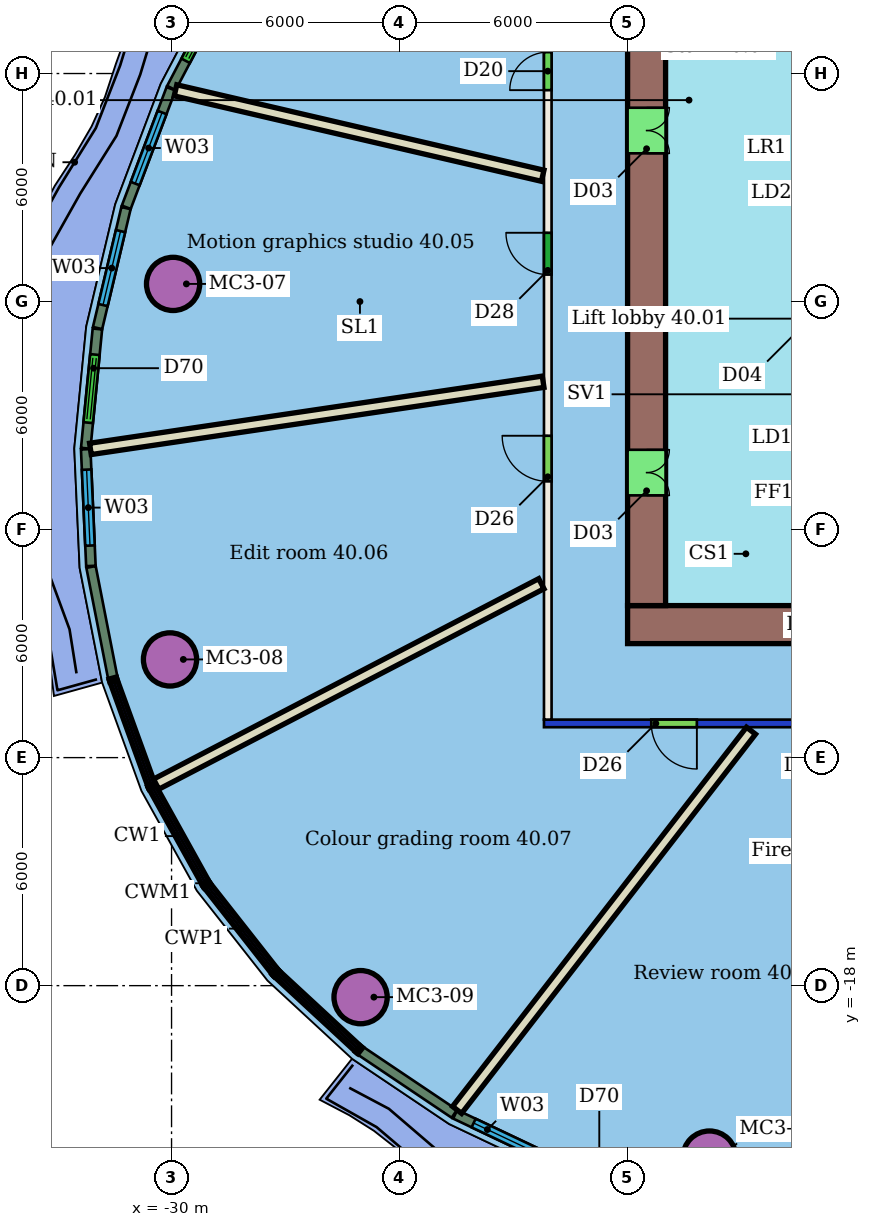
"""IFC4 building model, lengths in metres.
Left out: names, types, materials, properties, quantities, classifications, styles, units other than length and angle.
Written with IfcOpenShell. Run it as: python <this file> out.ifc"""

import sys

from ifc_helpers import new_model, si_unit, direction, frame, frame_2d, origin, origin_2d, place, context, subcontext, project, spatial, rectangle, hollow_circle, extrude, element, fill, save


model = new_model("IFC4")
c1 = context("Model", 3, precision=1e-05, world=origin(), true_north=direction((0.0, 1.0)))
c2 = subcontext(c1, "Body", "Model", "MODEL_VIEW")
j1 = project(units=[si_unit("LENGTHUNIT", "METRE"), si_unit("PLANEANGLEUNIT", "RADIAN")], contexts=[c1])
p1 = place(None, origin())
s1 = spatial("IfcSite", under=j1, at=p1, CompositionType="ELEMENT")
p2 = place(p1, origin())
s2 = spatial("IfcBuilding", under=s1, at=p2, CompositionType="ELEMENT")
p3 = place(p2, frame((0.0, 0.0, 168.6)))
s3 = spatial("IfcBuildingStorey", under=s2, at=p3, CompositionType="ELEMENT", Elevation=168.6)
for number, where, z_axis, x_axis in (
    (1, (-29.959, 0.464, 0.0), (0.0, 0.0, 1.0), (1.0, 0.0, 0.0)),
    (2, (-30.041, -9.417, 0.0), (0.0, 0.0, 1.0), (1.0, 0.0, 0.0)),
    (3, (-25.026, -18.303, 0.0), (0.0, 0.0, 1.0), (1.0, 0.0, 0.0)),
    (4, (-15.845, -22.524, 0.0), (0.0, 0.0, 1.0), (1.0, 0.0, 0.0)),
):
    element("IfcColumn", number, at=place(p3, frame(where, z_axis=z_axis, x_axis=x_axis)), inside=s3, PredefinedType="COLUMN", context=c2, shape_type="SweptSolid", body=[
        extrude(hollow_circle(Radius=0.7, WallThickness=0.05, at=origin_2d()), origin(), (0.0, 0.0, 1.0), 3.45),
    ])
p4 = place(p3, frame((8.2, -11.1, 0.0), z_axis=(0.0, 0.0, 1.0), x_axis=(-1.0, 0.0, 0.0)))
e5 = element("IfcWall", 5, at=p4, inside=s3, PredefinedType="PARTITIONING", context=c2, shape_type="SweptSolid", body=[
    extrude(rectangle(XDim=28.4, YDim=0.2, at=frame_2d((14.2, 0.0))), origin(), (0.0, 0.0, 1.0), 3.05),
])
p5 = place(p4, frame((24.377, 0.0, 0.0)))
e6 = element("IfcOpeningElement", 6, at=p5, cuts=e5, PredefinedType="OPENING", context=c2, shape_type="SweptSolid", body=[
    extrude(rectangle(XDim=1.2, YDim=2.1, at=frame_2d((0.6, 1.05))), frame((0.0, 0.11, 0.0), z_axis=(0.0, -1.0, 0.0), x_axis=(1.0, 0.0, 0.0)), (0.0, 0.0, 1.0), 0.22),
])
p6 = place(p4, frame((19.08, 0.0, 0.0)))
e7 = element("IfcOpeningElement", 7, at=p6, cuts=e5, PredefinedType="OPENING", context=c2, shape_type="SweptSolid", body=[
    extrude(rectangle(XDim=1.2, YDim=2.1, at=frame_2d((0.6, 1.05))), frame((0.0, 0.11, 0.0), z_axis=(0.0, -1.0, 0.0), x_axis=(1.0, 0.0, 0.0)), (0.0, 0.0, 1.0), 0.22),
])
p7 = place(p4, frame((14.784, 0.0, 0.0)))
e8 = element("IfcOpeningElement", 8, at=p7, cuts=e5, PredefinedType="OPENING", context=c2, shape_type="SweptSolid", body=[
    extrude(rectangle(XDim=1.8, YDim=2.4, at=frame_2d((0.9, 1.2))), frame((0.0, 0.11, 0.0), z_axis=(0.0, -1.0, 0.0), x_axis=(1.0, 0.0, 0.0)), (0.0, 0.0, 1.0), 0.22),
])
p8 = place(p4, frame((8.35, 0.0, 0.0)))
e9 = element("IfcOpeningElement", 9, at=p8, cuts=e5, PredefinedType="OPENING", context=c2, shape_type="SweptSolid", body=[
    extrude(rectangle(XDim=1.5, YDim=2.1, at=frame_2d((0.75, 1.05))), frame((0.0, 0.11, 0.0), z_axis=(0.0, -1.0, 0.0), x_axis=(1.0, 0.0, 0.0)), (0.0, 0.0, 1.0), 0.22),
])
p9 = place(p4, frame((3.691, 0.0, 0.0)))
e10 = element("IfcOpeningElement", 10, at=p9, cuts=e5, PredefinedType="OPENING", context=c2, shape_type="SweptSolid", body=[
    extrude(rectangle(XDim=1.2, YDim=2.1, at=frame_2d((0.6, 1.05))), frame((0.0, 0.11, 0.0), z_axis=(0.0, -1.0, 0.0), x_axis=(1.0, 0.0, 0.0)), (0.0, 0.0, 1.0), 0.22),
])
p10 = place(p3, frame((-20.1, -11.0, 0.0), z_axis=(0.0, 0.0, 1.0), x_axis=(0.0, 1.0, 0.0)))
e11 = element("IfcWall", 11, at=p10, inside=s3, PredefinedType="PARTITIONING", context=c2, shape_type="SweptSolid", body=[
    extrude(rectangle(XDim=22.0, YDim=0.2, at=frame_2d((11.0, 0.0))), origin(), (0.0, 0.0, 1.0), 3.45),
])
p11 = place(p10, frame((16.562, 0.0, 0.0)))
e12 = element("IfcOpeningElement", 12, at=p11, cuts=e11, PredefinedType="OPENING", context=c2, shape_type="SweptSolid", body=[
    extrude(rectangle(XDim=1.0, YDim=2.1, at=frame_2d((0.5, 1.05))), frame((0.0, 0.11, 0.0), z_axis=(0.0, -1.0, 0.0), x_axis=(1.0, 0.0, 0.0)), (0.0, 0.0, 1.0), 0.22),
])
p12 = place(p10, frame((11.71, 0.0, 0.0)))
e13 = element("IfcOpeningElement", 13, at=p12, cuts=e11, PredefinedType="OPENING", context=c2, shape_type="SweptSolid", body=[
    extrude(rectangle(XDim=1.1, YDim=2.1, at=frame_2d((0.55, 1.05))), frame((0.0, 0.11, 0.0), z_axis=(0.0, -1.0, 0.0), x_axis=(1.0, 0.0, 0.0)), (0.0, 0.0, 1.0), 0.22),
])
p13 = place(p10, frame((6.269, 0.0, 0.0)))
e14 = element("IfcOpeningElement", 14, at=p13, cuts=e11, PredefinedType="OPENING", context=c2, shape_type="SweptSolid", body=[
    extrude(rectangle(XDim=1.2, YDim=2.1, at=frame_2d((0.6, 1.05))), frame((0.0, 0.11, 0.0), z_axis=(0.0, -1.0, 0.0), x_axis=(1.0, 0.0, 0.0)), (0.0, 0.0, 1.0), 0.22),
])
p14 = place(p3, frame((-29.896, 5.558, 0.0), z_axis=(0.0, 0.0, 1.0), x_axis=(0.974001081483, -0.226543358476, 0.0)))
e15 = element("IfcWall", 15, at=p14, inside=s3, PredefinedType="PARTITIONING", context=c2, shape_type="SweptSolid", body=[
    extrude(rectangle(XDim=9.92, YDim=0.3, at=frame_2d((4.96, 0.0))), origin(), (0.0, 0.0, 1.0), 3.45),
])
p15 = place(p3, frame((-32.135, -3.877, 0.0), z_axis=(0.0, 0.0, 1.0), x_axis=(0.989174164401, 0.146746286091, 0.0)))
e16 = element("IfcWall", 16, at=p15, inside=s3, PredefinedType="PARTITIONING", context=c2, shape_type="SweptSolid", body=[
    extrude(rectangle(XDim=12.043, YDim=0.3, at=frame_2d((6.022, 0.0))), origin(), (0.0, 0.0, 1.0), 3.45),
])
p16 = place(p3, frame((-30.406, -12.699, 0.0), z_axis=(0.0, 0.0, 1.0), x_axis=(0.887102031539, 0.461573380557, 0.0)))
e17 = element("IfcWall", 17, at=p16, inside=s3, PredefinedType="PARTITIONING", context=c2, shape_type="SweptSolid", body=[
    extrude(rectangle(XDim=11.427, YDim=0.3, at=frame_2d((5.713, 0.0))), origin(), (0.0, 0.0, 1.0), 3.45),
])
p17 = place(p3, frame((-22.486, -21.271, 0.0), z_axis=(0.0, 0.0, 1.0), x_axis=(0.612600962366, 0.790392346185, 0.0)))
e18 = element("IfcWall", 18, at=p17, inside=s3, PredefinedType="PARTITIONING", context=c2, shape_type="SweptSolid", body=[
    extrude(rectangle(XDim=12.625, YDim=0.3, at=frame_2d((6.312, 0.0))), origin(), (0.0, 0.0, 1.0), 3.45),
])
p18 = place(p3, frame((-28.417, 8.643, 0.0), z_axis=(0.0, 0.0, 1.0), x_axis=(-0.464826893602, -0.885401580631, 0.0)))
e19 = element("IfcWall", 19, at=p18, inside=s3, PredefinedType="SOLIDWALL", context=c2, shape_type="SweptSolid", body=[
    extrude(rectangle(XDim=3.415, YDim=0.25, at=frame_2d((1.708, 0.0))), origin(), (0.0, 0.0, 1.0), 3.1),
])
p19 = place(p18, frame((0.807, 0.0, 0.0)))
e20 = element("IfcOpeningElement", 20, at=p19, cuts=e19, PredefinedType="OPENING", context=c2, shape_type="SweptSolid", body=[
    extrude(rectangle(XDim=1.8, YDim=2.4, at=frame_2d((0.9, 1.2))), frame((0.0, 0.135, 0.0), z_axis=(0.0, -1.0, 0.0), x_axis=(1.0, 0.0, 0.0)), (0.0, 0.0, 1.0), 0.27),
])
p20 = place(p3, frame((-30.014, 5.598, 0.0), z_axis=(0.0, 0.0, 1.0), x_axis=(-0.353443321973, -0.935455941321, 0.0)))
e21 = element("IfcWall", 21, at=p20, inside=s3, PredefinedType="SOLIDWALL", context=c2, shape_type="SweptSolid", body=[
    extrude(rectangle(XDim=3.332, YDim=0.25, at=frame_2d((1.666, 0.0))), origin(), (0.0, 0.0, 1.0), 3.1),
])
p21 = place(p20, frame((0.666, 0.0, 0.9)))
e22 = element("IfcOpeningElement", 22, at=p21, cuts=e21, PredefinedType="OPENING", context=c2, shape_type="SweptSolid", body=[
    extrude(rectangle(XDim=2.0, YDim=2.1, at=frame_2d((1.0, 1.05))), frame((0.0, 0.135, 0.0), z_axis=(0.0, -1.0, 0.0), x_axis=(1.0, 0.0, 0.0)), (0.0, 0.0, 1.0), 0.27),
])
p22 = place(p3, frame((-31.199, 2.458, 0.0), z_axis=(0.0, 0.0, 1.0), x_axis=(-0.230755279109, -0.973011819642, 0.0)))
e23 = element("IfcWall", 23, at=p22, inside=s3, PredefinedType="SOLIDWALL", context=c2, shape_type="SweptSolid", body=[
    extrude(rectangle(XDim=3.243, YDim=0.25, at=frame_2d((1.621, 0.0))), origin(), (0.0, 0.0, 1.0), 3.1),
])
p23 = place(p22, frame((0.621, 0.0, 0.9)))
e24 = element("IfcOpeningElement", 24, at=p23, cuts=e23, PredefinedType="OPENING", context=c2, shape_type="SweptSolid", body=[
    extrude(rectangle(XDim=2.0, YDim=2.1, at=frame_2d((1.0, 1.05))), frame((0.0, 0.135, 0.0), z_axis=(0.0, -1.0, 0.0), x_axis=(1.0, 0.0, 0.0)), (0.0, 0.0, 1.0), 0.27),
])
p24 = place(p3, frame((-31.951, -0.721, 0.0), z_axis=(0.0, 0.0, 1.0), x_axis=(-0.097518814735, -0.99523368149, 0.0)))
e25 = element("IfcWall", 25, at=p24, inside=s3, PredefinedType="SOLIDWALL", context=c2, shape_type="SweptSolid", body=[
    extrude(rectangle(XDim=3.155, YDim=0.25, at=frame_2d((1.577, 0.0))), origin(), (0.0, 0.0, 1.0), 3.1),
])
p25 = place(p24, frame((0.677, 0.0, 0.0)))
e26 = element("IfcOpeningElement", 26, at=p25, cuts=e25, PredefinedType="OPENING", context=c2, shape_type="SweptSolid", body=[
    extrude(rectangle(XDim=1.8, YDim=2.4, at=frame_2d((0.9, 1.2))), frame((0.0, 0.135, 0.0), z_axis=(0.0, -1.0, 0.0), x_axis=(1.0, 0.0, 0.0)), (0.0, 0.0, 1.0), 0.27),
])
p26 = place(p3, frame((-32.259, -3.887, 0.0), z_axis=(0.0, 0.0, 1.0), x_axis=(0.044643739649, -0.999002971222, 0.0)))
e27 = element("IfcWall", 27, at=p26, inside=s3, PredefinedType="SOLIDWALL", context=c2, shape_type="SweptSolid", body=[
    extrude(rectangle(XDim=3.073, YDim=0.25, at=frame_2d((1.537, 0.0))), origin(), (0.0, 0.0, 1.0), 3.1),
])
p27 = place(p26, frame((0.537, 0.0, 0.9)))
e28 = element("IfcOpeningElement", 28, at=p27, cuts=e27, PredefinedType="OPENING", context=c2, shape_type="SweptSolid", body=[
    extrude(rectangle(XDim=2.0, YDim=2.1, at=frame_2d((1.0, 1.05))), frame((0.0, 0.135, 0.0), z_axis=(0.0, -1.0, 0.0), x_axis=(1.0, 0.0, 0.0)), (0.0, 0.0, 1.0), 0.27),
])
p28 = place(p3, frame((-32.119, -6.983, 0.0), z_axis=(0.0, 0.0, 1.0), x_axis=(0.192503114172, -0.981296362489, 0.0)))
e29 = element("IfcWall", 29, at=p28, inside=s3, PredefinedType="SOLIDWALL", context=c2, shape_type="SweptSolid", body=[
    extrude(rectangle(XDim=2.964, YDim=0.25, at=frame_2d((1.482, 0.0))), origin(), (0.0, 0.0, 1.0), 3.1),
])
p29 = place(p3, frame((-25.019, -19.719, 0.0), z_axis=(0.0, 0.0, 1.0), x_axis=(0.830042449649, -0.557700216765, 0.0)))
e30 = element("IfcWall", 30, at=p29, inside=s3, PredefinedType="SOLIDWALL", context=c2, shape_type="SweptSolid", body=[
    extrude(rectangle(XDim=2.964, YDim=0.25, at=frame_2d((1.482, 0.0))), origin(), (0.0, 0.0, 1.0), 3.1),
])
p30 = place(p3, frame((-22.536, -21.385, 0.0), z_axis=(0.0, 0.0, 1.0), x_axis=(0.903619724227, -0.428335609058, 0.0)))
e31 = element("IfcWall", 31, at=p30, inside=s3, PredefinedType="SOLIDWALL", context=c2, shape_type="SweptSolid", body=[
    extrude(rectangle(XDim=3.073, YDim=0.25, at=frame_2d((1.537, 0.0))), origin(), (0.0, 0.0, 1.0), 3.1),
])
p31 = place(p30, frame((0.537, 0.0, 0.9)))
e32 = element("IfcOpeningElement", 32, at=p31, cuts=e31, PredefinedType="OPENING", context=c2, shape_type="SweptSolid", body=[
    extrude(rectangle(XDim=2.0, YDim=2.1, at=frame_2d((1.0, 1.05))), frame((0.0, 0.135, 0.0), z_axis=(0.0, -1.0, 0.0), x_axis=(1.0, 0.0, 0.0)), (0.0, 0.0, 1.0), 0.27),
])
p32 = place(p3, frame((-18.0, -8.5, 0.0), z_axis=(0.0, 0.0, 1.0), x_axis=(1.0, 0.0, 0.0)))
e33 = element("IfcWall", 33, at=p32, inside=s3, PredefinedType="SHEAR", context=c2, shape_type="SweptSolid", body=[
    extrude(rectangle(XDim=24.0, YDim=1.0, at=frame_2d((12.0, 0.0))), origin(), (0.0, 0.0, 1.0), 3.3),
])
p33 = place(p32, frame((6.0, 0.0, 0.0)))
e34 = element("IfcOpeningElement", 34, at=p33, cuts=e33, PredefinedType="OPENING", context=c2, shape_type="SweptSolid", body=[
    extrude(rectangle(XDim=1.2, YDim=2.1, at=frame_2d((0.6, 1.05))), frame((0.0, 0.51, 0.0), z_axis=(0.0, -1.0, 0.0), x_axis=(1.0, 0.0, 0.0)), (0.0, 0.0, 1.0), 1.02),
])
p34 = place(p3, frame((-17.5, 8.0, 0.0), z_axis=(0.0, 0.0, 1.0), x_axis=(0.0, -1.0, 0.0)))
e35 = element("IfcWall", 35, at=p34, inside=s3, PredefinedType="SHEAR", context=c2, shape_type="SweptSolid", body=[
    extrude(rectangle(XDim=16.0, YDim=1.0, at=frame_2d((8.0, 0.0))), origin(), (0.0, 0.0, 1.0), 3.3),
])
p35 = place(p34, frame((11.9, 0.0, 0.0)))
e36 = element("IfcOpeningElement", 36, at=p35, cuts=e35, PredefinedType="OPENING", context=c2, shape_type="SweptSolid", body=[
    extrude(rectangle(XDim=1.2, YDim=2.1, at=frame_2d((0.6, 1.05))), frame((0.0, 0.51, 0.0), z_axis=(0.0, -1.0, 0.0), x_axis=(1.0, 0.0, 0.0)), (0.0, 0.0, 1.0), 1.02),
])
p36 = place(p34, frame((2.9, 0.0, 0.0)))
e37 = element("IfcOpeningElement", 37, at=p36, cuts=e35, PredefinedType="OPENING", context=c2, shape_type="SweptSolid", body=[
    extrude(rectangle(XDim=1.2, YDim=2.1, at=frame_2d((0.6, 1.05))), frame((0.0, 0.51, 0.0), z_axis=(0.0, -1.0, 0.0), x_axis=(1.0, 0.0, 0.0)), (0.0, 0.0, 1.0), 1.02),
])
p37 = place(p11, origin())
e38 = element("IfcDoor", 38, at=p37, inside=s3, OperationType="SINGLE_SWING_LEFT", PredefinedType="DOOR", context=c2, shape_type="SweptSolid", body=[
    extrude(rectangle(XDim=1.0, YDim=2.1, at=frame_2d((0.5, 1.05))), frame((0.0, 0.025, 0.0), z_axis=(0.0, -1.0, 0.0), x_axis=(1.0, 0.0, 0.0)), (0.0, 0.0, 1.0), 0.05),
])
fill(e12, e38)
p38 = place(p12, origin())
e39 = element("IfcDoor", 39, at=p38, inside=s3, OperationType="SINGLE_SWING_RIGHT", PredefinedType="DOOR", context=c2, shape_type="SweptSolid", body=[
    extrude(rectangle(XDim=1.1, YDim=2.1, at=frame_2d((0.55, 1.05))), frame((0.0, 0.025, 0.0), z_axis=(0.0, -1.0, 0.0), x_axis=(1.0, 0.0, 0.0)), (0.0, 0.0, 1.0), 0.05),
])
fill(e13, e39)
p39 = place(p13, origin())
e40 = element("IfcDoor", 40, at=p39, inside=s3, OperationType="SINGLE_SWING_RIGHT", PredefinedType="DOOR", context=c2, shape_type="SweptSolid", body=[
    extrude(rectangle(XDim=1.2, YDim=2.1, at=frame_2d((0.6, 1.05))), frame((0.0, 0.025, 0.0), z_axis=(0.0, -1.0, 0.0), x_axis=(1.0, 0.0, 0.0)), (0.0, 0.0, 1.0), 0.05),
])
fill(e14, e40)
p40 = place(p5, origin())
e41 = element("IfcDoor", 41, at=p40, inside=s3, OperationType="SINGLE_SWING_LEFT", PredefinedType="DOOR", context=c2, shape_type="SweptSolid", body=[
    extrude(rectangle(XDim=1.2, YDim=2.1, at=frame_2d((0.6, 1.05))), frame((0.0, 0.025, 0.0), z_axis=(0.0, -1.0, 0.0), x_axis=(1.0, 0.0, 0.0)), (0.0, 0.0, 1.0), 0.05),
])
fill(e6, e41)
p41 = place(p19, origin())
e42 = element("IfcDoor", 42, at=p41, inside=s3, OperationType="DOUBLE_DOOR_SLIDING", PredefinedType="DOOR", context=c2, shape_type="SweptSolid", body=[
    extrude(rectangle(XDim=1.8, YDim=2.4, at=frame_2d((0.9, 1.2))), frame((0.0, 0.025, 0.0), z_axis=(0.0, -1.0, 0.0), x_axis=(1.0, 0.0, 0.0)), (0.0, 0.0, 1.0), 0.05),
])
fill(e20, e42)
p42 = place(p21, origin())
e43 = element("IfcWindow", 43, at=p42, inside=s3, PartitioningType="SINGLE_PANEL", PredefinedType="WINDOW", context=c2, shape_type="SweptSolid", body=[
    extrude(rectangle(XDim=2.0, YDim=2.1, at=frame_2d((1.0, 1.05))), frame((0.0, 0.03, 0.0), z_axis=(0.0, -1.0, 0.0), x_axis=(1.0, 0.0, 0.0)), (0.0, 0.0, 1.0), 0.06),
])
fill(e22, e43)
p43 = place(p23, origin())
e44 = element("IfcWindow", 44, at=p43, inside=s3, PartitioningType="SINGLE_PANEL", PredefinedType="WINDOW", context=c2, shape_type="SweptSolid", body=[
    extrude(rectangle(XDim=2.0, YDim=2.1, at=frame_2d((1.0, 1.05))), frame((0.0, 0.03, 0.0), z_axis=(0.0, -1.0, 0.0), x_axis=(1.0, 0.0, 0.0)), (0.0, 0.0, 1.0), 0.06),
])
fill(e24, e44)
p44 = place(p25, origin())
e45 = element("IfcDoor", 45, at=p44, inside=s3, OperationType="DOUBLE_DOOR_SLIDING", PredefinedType="DOOR", context=c2, shape_type="SweptSolid", body=[
    extrude(rectangle(XDim=1.8, YDim=2.4, at=frame_2d((0.9, 1.2))), frame((0.0, 0.025, 0.0), z_axis=(0.0, -1.0, 0.0), x_axis=(1.0, 0.0, 0.0)), (0.0, 0.0, 1.0), 0.05),
])
fill(e26, e45)
p45 = place(p27, origin())
e46 = element("IfcWindow", 46, at=p45, inside=s3, PartitioningType="SINGLE_PANEL", PredefinedType="WINDOW", context=c2, shape_type="SweptSolid", body=[
    extrude(rectangle(XDim=2.0, YDim=2.1, at=frame_2d((1.0, 1.05))), frame((0.0, 0.03, 0.0), z_axis=(0.0, -1.0, 0.0), x_axis=(1.0, 0.0, 0.0)), (0.0, 0.0, 1.0), 0.06),
])
fill(e28, e46)
p46 = place(p31, origin())
e47 = element("IfcWindow", 47, at=p46, inside=s3, PartitioningType="SINGLE_PANEL", PredefinedType="WINDOW", context=c2, shape_type="SweptSolid", body=[
    extrude(rectangle(XDim=2.0, YDim=2.1, at=frame_2d((1.0, 1.05))), frame((0.0, 0.03, 0.0), z_axis=(0.0, -1.0, 0.0), x_axis=(1.0, 0.0, 0.0)), (0.0, 0.0, 1.0), 0.06),
])
fill(e32, e47)
p47 = place(p35, origin())
e48 = element("IfcDoor", 48, at=p47, inside=s3, OperationType="DOUBLE_DOOR_SINGLE_SWING", PredefinedType="NOTDEFINED", context=c2, shape_type="SweptSolid", body=[
    extrude(rectangle(XDim=1.2, YDim=2.1, at=frame_2d((0.6, 1.05))), frame((0.0, 0.025, 0.0), z_axis=(0.0, -1.0, 0.0), x_axis=(1.0, 0.0, 0.0)), (0.0, 0.0, 1.0), 0.05),
])
fill(e36, e48)
p48 = place(p36, origin())
e49 = element("IfcDoor", 49, at=p48, inside=s3, OperationType="DOUBLE_DOOR_SINGLE_SWING", PredefinedType="NOTDEFINED", context=c2, shape_type="SweptSolid", body=[
    extrude(rectangle(XDim=1.2, YDim=2.1, at=frame_2d((0.6, 1.05))), frame((0.0, 0.025, 0.0), z_axis=(0.0, -1.0, 0.0), x_axis=(1.0, 0.0, 0.0)), (0.0, 0.0, 1.0), 0.05),
])
fill(e37, e49)
save(model, sys.argv[1])
